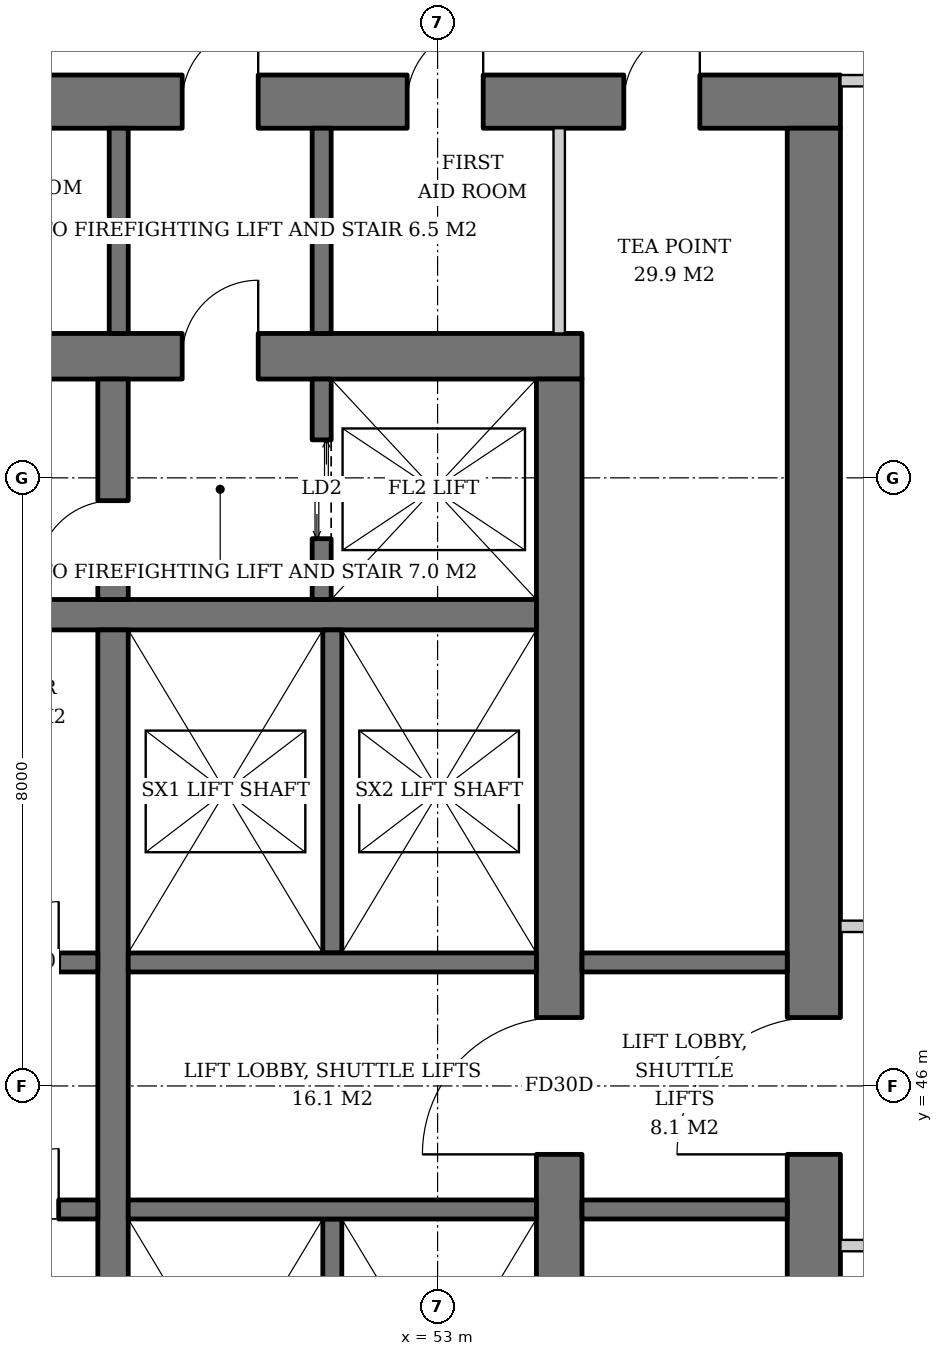
"""IFC4 building model, lengths in metres.
Left out: names, types, materials, properties, quantities, classifications, styles, units other than length and angle.
Written with IfcOpenShell. Run it as: python <this file> out.ifc"""

import sys

from ifc_helpers import new_model, si_unit, direction, frame, frame_2d, origin, place, context, subcontext, project, spatial, rectangle, extrude, element, fill, save


model = new_model("IFC4")
c1 = context("Model", 3, precision=1e-05, world=origin(), true_north=direction((0.0, 1.0)))
c2 = subcontext(c1, "Body", "Model", "MODEL_VIEW")
j1 = project(units=[si_unit("LENGTHUNIT", "METRE"), si_unit("PLANEANGLEUNIT", "RADIAN")], contexts=[c1])
p1 = place(None, origin())
s1 = spatial("IfcSite", under=j1, at=p1, CompositionType="ELEMENT")
p2 = place(p1, origin())
s2 = spatial("IfcBuilding", under=s1, at=p2, CompositionType="ELEMENT")
p3 = place(p2, frame((0.0, 0.0, 123.6)))
s3 = spatial("IfcBuildingStorey", under=s2, at=p3, CompositionType="ELEMENT", Elevation=123.6)
p4 = place(p3, frame((35.1, 55.6, 0.0), z_axis=(0.0, 0.0, 1.0), x_axis=(1.0, 0.0, 0.0)))
e1 = element("IfcWall", 1, at=p4, inside=s3, PredefinedType="SHEAR", context=c2, shape_type="SweptSolid", body=[
    extrude(rectangle(XDim=19.8, YDim=0.6, at=frame_2d((9.9, 0.0))), origin(), (0.0, 0.0, 1.0), 3.8),
])
p5 = place(p4, frame((14.54, 0.0, 0.0)))
e2 = element("IfcOpeningElement", 2, at=p5, cuts=e1, PredefinedType="OPENING", context=c2, shape_type="SweptSolid", body=[
    extrude(rectangle(XDim=1.0, YDim=2.1, at=frame_2d((0.5, 1.05))), frame((0.0, 0.31, 0.0), z_axis=(0.0, -1.0, 0.0), x_axis=(1.0, 0.0, 0.0)), (0.0, 0.0, 1.0), 0.62),
])
p6 = place(p4, frame((2.425, 0.0, 0.0)))
e3 = element("IfcOpeningElement", 3, at=p6, cuts=e1, PredefinedType="OPENING", context=c2, shape_type="SweptSolid", body=[
    extrude(rectangle(XDim=1.0, YDim=2.1, at=frame_2d((0.5, 1.05))), frame((0.0, 0.31, 0.0), z_axis=(0.0, -1.0, 0.0), x_axis=(1.0, 0.0, 0.0)), (0.0, 0.0, 1.0), 0.62),
])
p7 = place(p3, frame((54.6, 36.7, 0.0), z_axis=(0.0, 0.0, 1.0), x_axis=(0.0, 1.0, 0.0)))
e4 = element("IfcWall", 4, at=p7, inside=s3, PredefinedType="SHEAR", context=c2, shape_type="SweptSolid", body=[
    extrude(rectangle(XDim=18.6, YDim=0.6, at=frame_2d((9.3, 0.0))), origin(), (0.0, 0.0, 1.0), 3.8),
])
p8 = place(p7, frame((8.4, 0.0, 0.0)))
e5 = element("IfcOpeningElement", 5, at=p8, cuts=e4, PredefinedType="OPENING", context=c2, shape_type="SweptSolid", body=[
    extrude(rectangle(XDim=1.8, YDim=2.4, at=frame_2d((0.9, 1.2))), frame((0.0, 0.31, 0.0), z_axis=(0.0, -1.0, 0.0), x_axis=(1.0, 0.0, 0.0)), (0.0, 0.0, 1.0), 0.62),
])
p9 = place(p3, frame((31.7, 58.95, 0.0), z_axis=(0.0, 0.0, 1.0), x_axis=(1.0, 0.0, 0.0)))
e6 = element("IfcWall", 6, at=p9, inside=s3, PredefinedType="SHEAR", context=c2, shape_type="SweptSolid", body=[
    extrude(rectangle(XDim=26.6, YDim=0.7, at=frame_2d((13.3, 0.0))), origin(), (0.0, 0.0, 1.0), 3.8),
])
p10 = place(p9, frame((17.94, 0.0, 0.0)))
e7 = element("IfcOpeningElement", 7, at=p10, cuts=e6, PredefinedType="OPENING", context=c2, shape_type="SweptSolid", body=[
    extrude(rectangle(XDim=1.0, YDim=2.1, at=frame_2d((0.5, 1.05))), frame((0.0, 0.36, 0.0), z_axis=(0.0, -1.0, 0.0), x_axis=(1.0, 0.0, 0.0)), (0.0, 0.0, 1.0), 0.72),
])
p11 = place(p9, frame((5.825, 0.0, 0.0)))
e8 = element("IfcOpeningElement", 8, at=p11, cuts=e6, PredefinedType="OPENING", context=c2, shape_type="SweptSolid", body=[
    extrude(rectangle(XDim=1.0, YDim=2.1, at=frame_2d((0.5, 1.05))), frame((0.0, 0.36, 0.0), z_axis=(0.0, -1.0, 0.0), x_axis=(1.0, 0.0, 0.0)), (0.0, 0.0, 1.0), 0.72),
])
p12 = place(p9, frame((1.837, 0.0, 0.0)))
e9 = element("IfcOpeningElement", 9, at=p12, cuts=e6, PredefinedType="OPENING", context=c2, shape_type="SweptSolid", body=[
    extrude(rectangle(XDim=1.0, YDim=2.1, at=frame_2d((0.5, 1.05))), frame((0.0, 0.36, 0.0), z_axis=(0.0, -1.0, 0.0), x_axis=(1.0, 0.0, 0.0)), (0.0, 0.0, 1.0), 0.72),
])
p13 = place(p9, frame((3.781, 0.0, 0.0)))
e10 = element("IfcOpeningElement", 10, at=p13, cuts=e6, PredefinedType="OPENING", context=c2, shape_type="SweptSolid", body=[
    extrude(rectangle(XDim=1.0, YDim=2.1, at=frame_2d((0.5, 1.05))), frame((0.0, 0.36, 0.0), z_axis=(0.0, -1.0, 0.0), x_axis=(1.0, 0.0, 0.0)), (0.0, 0.0, 1.0), 0.72),
])
p14 = place(p9, frame((8.342, 0.0, 0.0)))
e11 = element("IfcOpeningElement", 11, at=p14, cuts=e6, PredefinedType="OPENING", context=c2, shape_type="SweptSolid", body=[
    extrude(rectangle(XDim=1.0, YDim=2.1, at=frame_2d((0.5, 1.05))), frame((0.0, 0.36, 0.0), z_axis=(0.0, -1.0, 0.0), x_axis=(1.0, 0.0, 0.0)), (0.0, 0.0, 1.0), 0.72),
])
p15 = place(p9, frame((11.626, 0.0, 0.0)))
e12 = element("IfcOpeningElement", 12, at=p15, cuts=e6, PredefinedType="OPENING", context=c2, shape_type="SweptSolid", body=[
    extrude(rectangle(XDim=1.0, YDim=2.1, at=frame_2d((0.5, 1.05))), frame((0.0, 0.36, 0.0), z_axis=(0.0, -1.0, 0.0), x_axis=(1.0, 0.0, 0.0)), (0.0, 0.0, 1.0), 0.72),
])
p16 = place(p9, frame((14.862, 0.0, 0.0)))
e13 = element("IfcOpeningElement", 13, at=p16, cuts=e6, PredefinedType="OPENING", context=c2, shape_type="SweptSolid", body=[
    extrude(rectangle(XDim=1.0, YDim=2.1, at=frame_2d((0.5, 1.05))), frame((0.0, 0.36, 0.0), z_axis=(0.0, -1.0, 0.0), x_axis=(1.0, 0.0, 0.0)), (0.0, 0.0, 1.0), 0.72),
])
p17 = place(p9, frame((20.9, 0.0, 0.0)))
e14 = element("IfcOpeningElement", 14, at=p17, cuts=e6, PredefinedType="OPENING", context=c2, shape_type="SweptSolid", body=[
    extrude(rectangle(XDim=1.0, YDim=2.1, at=frame_2d((0.5, 1.05))), frame((0.0, 0.36, 0.0), z_axis=(0.0, -1.0, 0.0), x_axis=(1.0, 0.0, 0.0)), (0.0, 0.0, 1.0), 0.72),
])
p18 = place(p9, frame((23.75, 0.0, 0.0)))
e15 = element("IfcOpeningElement", 15, at=p18, cuts=e6, PredefinedType="OPENING", context=c2, shape_type="SweptSolid", body=[
    extrude(rectangle(XDim=1.0, YDim=2.1, at=frame_2d((0.5, 1.05))), frame((0.0, 0.36, 0.0), z_axis=(0.0, -1.0, 0.0), x_axis=(1.0, 0.0, 0.0)), (0.0, 0.0, 1.0), 0.72),
])
p19 = place(p3, frame((57.95, 33.4, 0.0), z_axis=(0.0, 0.0, 1.0), x_axis=(0.0, 1.0, 0.0)))
e16 = element("IfcWall", 16, at=p19, inside=s3, PredefinedType="SHEAR", context=c2, shape_type="SweptSolid", body=[
    extrude(rectangle(XDim=25.2, YDim=0.7, at=frame_2d((12.6, 0.0))), origin(), (0.0, 0.0, 1.0), 3.8),
])
p20 = place(p19, frame((11.7, 0.0, 0.0)))
e17 = element("IfcOpeningElement", 17, at=p20, cuts=e16, PredefinedType="OPENING", context=c2, shape_type="SweptSolid", body=[
    extrude(rectangle(XDim=1.8, YDim=2.4, at=frame_2d((0.9, 1.2))), frame((0.0, 0.36, 0.0), z_axis=(0.0, -1.0, 0.0), x_axis=(1.0, 0.0, 0.0)), (0.0, 0.0, 1.0), 0.72),
])
p21 = place(p3, frame((35.7, 52.2, 0.0), z_axis=(0.0, 0.0, 1.0), x_axis=(1.0, 0.0, 0.0)))
e18 = element("IfcWall", 18, at=p21, inside=s3, PredefinedType="SHEAR", context=c2, shape_type="SweptSolid", body=[
    extrude(rectangle(XDim=18.6, YDim=0.4, at=frame_2d((9.3, 0.0))), origin(), (0.0, 0.0, 1.0), 3.8),
])
p22 = place(p3, frame((48.73, 40.0, 0.0), z_axis=(0.0, 0.0, 1.0), x_axis=(0.0, 1.0, 0.0)))
e19 = element("IfcWall", 19, at=p22, inside=s3, PredefinedType="SHEAR", context=c2, shape_type="SweptSolid", body=[
    extrude(rectangle(XDim=12.0, YDim=0.4, at=frame_2d((6.0, 0.0))), origin(), (0.0, 0.0, 1.0), 3.8),
])
p23 = place(p3, frame((48.73, 52.4, 0.0), z_axis=(0.0, 0.0, 1.0), x_axis=(0.0, 1.0, 0.0)))
e20 = element("IfcWall", 20, at=p23, inside=s3, PredefinedType="SHEAR", context=c2, shape_type="SweptSolid", body=[
    extrude(rectangle(XDim=2.9, YDim=0.4, at=frame_2d((1.45, 0.0))), origin(), (0.0, 0.0, 1.0), 3.8),
])
p24 = place(p23, frame((0.3, 0.0, 0.0)))
e21 = element("IfcOpeningElement", 21, at=p24, cuts=e20, PredefinedType="OPENING", context=c2, shape_type="SweptSolid", body=[
    extrude(rectangle(XDim=1.0, YDim=2.1, at=frame_2d((0.5, 1.05))), frame((0.0, 0.21, 0.0), z_axis=(0.0, -1.0, 0.0), x_axis=(1.0, 0.0, 0.0)), (0.0, 0.0, 1.0), 0.42),
])
p25 = place(p3, frame((51.475, 52.4, 0.0), z_axis=(0.0, 0.0, 1.0), x_axis=(0.0, 1.0, 0.0)))
e22 = element("IfcWall", 22, at=p25, inside=s3, PredefinedType="SHEAR", context=c2, shape_type="SweptSolid", body=[
    extrude(rectangle(XDim=2.9, YDim=0.25, at=frame_2d((1.45, 0.0))), origin(), (0.0, 0.0, 1.0), 3.8),
])
p26 = place(p25, frame((0.8, 0.0, 0.0)))
e23 = element("IfcOpeningElement", 23, at=p26, cuts=e22, PredefinedType="OPENING", context=c2, shape_type="SweptSolid", body=[
    extrude(rectangle(XDim=1.3, YDim=2.2, at=frame_2d((0.65, 1.1))), frame((0.0, 0.135, 0.0), z_axis=(0.0, -1.0, 0.0), x_axis=(1.0, 0.0, 0.0)), (0.0, 0.0, 1.0), 0.27),
])
p27 = place(p3, frame((35.7, 47.625, 0.0), z_axis=(0.0, 0.0, 1.0), x_axis=(1.0, 0.0, 0.0)))
e24 = element("IfcWall", 24, at=p27, inside=s3, PredefinedType="SHEAR", context=c2, shape_type="SweptSolid", body=[
    extrude(rectangle(XDim=12.83, YDim=0.25, at=frame_2d((6.415, 0.0))), origin(), (0.0, 0.0, 1.0), 3.8),
])
p28 = place(p27, frame((0.7, 0.0, 0.0)))
e25 = element("IfcOpeningElement", 25, at=p28, cuts=e24, PredefinedType="OPENING", context=c2, shape_type="SweptSolid", body=[
    extrude(rectangle(XDim=1.1, YDim=2.2, at=frame_2d((0.55, 1.1))), frame((0.0, 0.135, 0.0), z_axis=(0.0, -1.0, 0.0), x_axis=(1.0, 0.0, 0.0)), (0.0, 0.0, 1.0), 0.27),
])
p29 = place(p27, frame((3.45, 0.0, 0.0)))
e26 = element("IfcOpeningElement", 26, at=p29, cuts=e24, PredefinedType="OPENING", context=c2, shape_type="SweptSolid", body=[
    extrude(rectangle(XDim=1.1, YDim=2.2, at=frame_2d((0.55, 1.1))), frame((0.0, 0.135, 0.0), z_axis=(0.0, -1.0, 0.0), x_axis=(1.0, 0.0, 0.0)), (0.0, 0.0, 1.0), 0.27),
])
p30 = place(p27, frame((6.2, 0.0, 0.0)))
e27 = element("IfcOpeningElement", 27, at=p30, cuts=e24, PredefinedType="OPENING", context=c2, shape_type="SweptSolid", body=[
    extrude(rectangle(XDim=1.1, YDim=2.2, at=frame_2d((0.55, 1.1))), frame((0.0, 0.135, 0.0), z_axis=(0.0, -1.0, 0.0), x_axis=(1.0, 0.0, 0.0)), (0.0, 0.0, 1.0), 0.27),
])
p31 = place(p27, frame((8.95, 0.0, 0.0)))
e28 = element("IfcOpeningElement", 28, at=p31, cuts=e24, PredefinedType="OPENING", context=c2, shape_type="SweptSolid", body=[
    extrude(rectangle(XDim=1.1, YDim=2.2, at=frame_2d((0.55, 1.1))), frame((0.0, 0.135, 0.0), z_axis=(0.0, -1.0, 0.0), x_axis=(1.0, 0.0, 0.0)), (0.0, 0.0, 1.0), 0.27),
])
p32 = place(p27, frame((11.515, 0.0, 0.0)))
e29 = element("IfcOpeningElement", 29, at=p32, cuts=e24, PredefinedType="OPENING", context=c2, shape_type="SweptSolid", body=[
    extrude(rectangle(XDim=0.8, YDim=2.0, at=frame_2d((0.4, 1.0))), frame((0.0, 0.135, 0.0), z_axis=(0.0, -1.0, 0.0), x_axis=(1.0, 0.0, 0.0)), (0.0, 0.0, 1.0), 0.27),
])
p33 = place(p3, frame((35.7, 44.375, 0.0), z_axis=(0.0, 0.0, 1.0), x_axis=(1.0, 0.0, 0.0)))
e30 = element("IfcWall", 30, at=p33, inside=s3, PredefinedType="SHEAR", context=c2, shape_type="SweptSolid", body=[
    extrude(rectangle(XDim=12.83, YDim=0.25, at=frame_2d((6.415, 0.0))), origin(), (0.0, 0.0, 1.0), 3.8),
])
p34 = place(p33, frame((0.7, 0.0, 0.0)))
e31 = element("IfcOpeningElement", 31, at=p34, cuts=e30, PredefinedType="OPENING", context=c2, shape_type="SweptSolid", body=[
    extrude(rectangle(XDim=1.1, YDim=2.2, at=frame_2d((0.55, 1.1))), frame((0.0, 0.135, 0.0), z_axis=(0.0, -1.0, 0.0), x_axis=(1.0, 0.0, 0.0)), (0.0, 0.0, 1.0), 0.27),
])
p35 = place(p33, frame((3.45, 0.0, 0.0)))
e32 = element("IfcOpeningElement", 32, at=p35, cuts=e30, PredefinedType="OPENING", context=c2, shape_type="SweptSolid", body=[
    extrude(rectangle(XDim=1.1, YDim=2.2, at=frame_2d((0.55, 1.1))), frame((0.0, 0.135, 0.0), z_axis=(0.0, -1.0, 0.0), x_axis=(1.0, 0.0, 0.0)), (0.0, 0.0, 1.0), 0.27),
])
p36 = place(p33, frame((6.2, 0.0, 0.0)))
e33 = element("IfcOpeningElement", 33, at=p36, cuts=e30, PredefinedType="OPENING", context=c2, shape_type="SweptSolid", body=[
    extrude(rectangle(XDim=1.1, YDim=2.2, at=frame_2d((0.55, 1.1))), frame((0.0, 0.135, 0.0), z_axis=(0.0, -1.0, 0.0), x_axis=(1.0, 0.0, 0.0)), (0.0, 0.0, 1.0), 0.27),
])
p37 = place(p33, frame((8.95, 0.0, 0.0)))
e34 = element("IfcOpeningElement", 34, at=p37, cuts=e30, PredefinedType="OPENING", context=c2, shape_type="SweptSolid", body=[
    extrude(rectangle(XDim=1.1, YDim=2.2, at=frame_2d((0.55, 1.1))), frame((0.0, 0.135, 0.0), z_axis=(0.0, -1.0, 0.0), x_axis=(1.0, 0.0, 0.0)), (0.0, 0.0, 1.0), 0.27),
])
p38 = place(p33, frame((11.515, 0.0, 0.0)))
e35 = element("IfcOpeningElement", 35, at=p38, cuts=e30, PredefinedType="OPENING", context=c2, shape_type="SweptSolid", body=[
    extrude(rectangle(XDim=0.8, YDim=2.0, at=frame_2d((0.4, 1.0))), frame((0.0, 0.135, 0.0), z_axis=(0.0, -1.0, 0.0), x_axis=(1.0, 0.0, 0.0)), (0.0, 0.0, 1.0), 0.27),
])
p39 = place(p3, frame((51.615, 47.75, 0.0), z_axis=(0.0, 0.0, 1.0), x_axis=(0.0, 1.0, 0.0)))
e36 = element("IfcWall", 36, at=p39, inside=s3, PredefinedType="SHEAR", context=c2, shape_type="SweptSolid", body=[
    extrude(rectangle(XDim=4.25, YDim=0.25, at=frame_2d((2.125, 0.0))), origin(), (0.0, 0.0, 1.0), 3.8),
])
p40 = place(p3, frame((48.93, 47.625, 0.0), z_axis=(0.0, 0.0, 1.0), x_axis=(1.0, 0.0, 0.0)))
e37 = element("IfcWall", 37, at=p40, inside=s3, PredefinedType="SHEAR", context=c2, shape_type="SweptSolid", body=[
    extrude(rectangle(XDim=5.37, YDim=0.25, at=frame_2d((2.685, 0.0))), origin(), (0.0, 0.0, 1.0), 3.8),
])
p41 = place(p3, frame((51.615, 44.25, 0.0), z_axis=(0.0, 0.0, 1.0), x_axis=(0.0, -1.0, 0.0)))
e38 = element("IfcWall", 38, at=p41, inside=s3, PredefinedType="SHEAR", context=c2, shape_type="SweptSolid", body=[
    extrude(rectangle(XDim=4.25, YDim=0.25, at=frame_2d((2.125, 0.0))), origin(), (0.0, 0.0, 1.0), 3.8),
])
p42 = place(p3, frame((48.93, 44.375, 0.0), z_axis=(0.0, 0.0, 1.0), x_axis=(1.0, 0.0, 0.0)))
e39 = element("IfcWall", 39, at=p42, inside=s3, PredefinedType="SHEAR", context=c2, shape_type="SweptSolid", body=[
    extrude(rectangle(XDim=5.37, YDim=0.25, at=frame_2d((2.685, 0.0))), origin(), (0.0, 0.0, 1.0), 3.8),
])
for number, where, z_axis, x_axis in (
    (40, (48.805, 55.9, 0.0), (0.0, 0.0, 1.0), (0.0, 1.0, 0.0)),
    (41, (51.475, 55.9, 0.0), (0.0, 0.0, 1.0), (0.0, 1.0, 0.0)),
    (42, (54.9, 44.375, 0.0), (0.0, 0.0, 1.0), (1.0, 0.0, 0.0)),
    (43, (54.9, 47.625, 0.0), (0.0, 0.0, 1.0), (1.0, 0.0, 0.0)),
):
    element("IfcWall", number, at=place(p3, frame(where, z_axis=z_axis, x_axis=x_axis)), inside=s3, PredefinedType="SOLIDWALL", context=c2, shape_type="SweptSolid", body=[
        extrude(rectangle(XDim=2.7, YDim=0.25, at=frame_2d((1.35, 0.0))), origin(), (0.0, 0.0, 1.0), 3.62),
    ])
p43 = place(p3, frame((54.6, 55.9, 0.0), z_axis=(0.0, 0.0, 1.0), x_axis=(0.0, 1.0, 0.0)))
e44 = element("IfcWall", 44, at=p43, inside=s3, PredefinedType="SOLIDWALL", context=c2, shape_type="SweptSolid", body=[
    extrude(rectangle(XDim=2.7, YDim=0.15, at=frame_2d((1.35, 0.0))), origin(), (0.0, 0.0, 1.0), 3.62),
])
for number, where, z_axis, x_axis in (
    (45, (58.3, 43.9, 0.0), (0.0, 0.0, 1.0), (1.0, 0.0, 0.0)),
    (46, (58.3, 48.1, 0.0), (0.0, 0.0, 1.0), (1.0, 0.0, 0.0)),
    (47, (58.3, 59.225, 0.0), (0.0, 0.0, 1.0), (1.0, 0.0, 0.0)),
):
    element("IfcWall", number, at=place(p3, frame(where, z_axis=z_axis, x_axis=x_axis)), inside=s3, PredefinedType="PARTITIONING", context=c2, shape_type="SweptSolid", body=[
        extrude(rectangle(XDim=1.725, YDim=0.15, at=frame_2d((0.862, 0.0))), origin(), (0.0, 0.0, 1.0), 3.62),
    ])
p44 = place(p26, origin())
e48 = element("IfcDoor", 48, at=p44, inside=s3, OperationType="DOUBLE_DOOR_SLIDING", PredefinedType="DOOR", context=c2, shape_type="SweptSolid", body=[
    extrude(rectangle(XDim=1.3, YDim=2.2, at=frame_2d((0.65, 1.1))), frame((0.0, 0.025, 0.0), z_axis=(0.0, -1.0, 0.0), x_axis=(1.0, 0.0, 0.0)), (0.0, 0.0, 1.0), 0.05),
])
fill(e23, e48)
p45 = place(p32, origin())
e49 = element("IfcDoor", 49, at=p45, inside=s3, OperationType="SINGLE_SWING_RIGHT", PredefinedType="DOOR", context=c2, shape_type="SweptSolid", body=[
    extrude(rectangle(XDim=0.8, YDim=2.0, at=frame_2d((0.4, 1.0))), frame((0.0, 0.025, 0.0), z_axis=(0.0, -1.0, 0.0), x_axis=(1.0, 0.0, 0.0)), (0.0, 0.0, 1.0), 0.05),
])
fill(e29, e49)
p46 = place(p38, origin())
e50 = element("IfcDoor", 50, at=p46, inside=s3, OperationType="SINGLE_SWING_RIGHT", PredefinedType="DOOR", context=c2, shape_type="SweptSolid", body=[
    extrude(rectangle(XDim=0.8, YDim=2.0, at=frame_2d((0.4, 1.0))), frame((0.0, 0.025, 0.0), z_axis=(0.0, -1.0, 0.0), x_axis=(1.0, 0.0, 0.0)), (0.0, 0.0, 1.0), 0.05),
])
fill(e35, e50)
p47 = place(p24, origin())
e51 = element("IfcDoor", 51, at=p47, inside=s3, OperationType="SINGLE_SWING_LEFT", PredefinedType="DOOR", context=c2, shape_type="SweptSolid", body=[
    extrude(rectangle(XDim=1.0, YDim=2.1, at=frame_2d((0.5, 1.05))), frame((0.0, 0.025, 0.0), z_axis=(0.0, -1.0, 0.0), x_axis=(1.0, 0.0, 0.0)), (0.0, 0.0, 1.0), 0.05),
])
fill(e21, e51)
p48 = place(p5, origin())
e52 = element("IfcDoor", 52, at=p48, inside=s3, OperationType="SINGLE_SWING_RIGHT", PredefinedType="DOOR", context=c2, shape_type="SweptSolid", body=[
    extrude(rectangle(XDim=1.0, YDim=2.1, at=frame_2d((0.5, 1.05))), frame((0.0, 0.025, 0.0), z_axis=(0.0, -1.0, 0.0), x_axis=(1.0, 0.0, 0.0)), (0.0, 0.0, 1.0), 0.05),
])
fill(e2, e52)
p49 = place(p8, origin())
e53 = element("IfcDoor", 53, at=p49, inside=s3, OperationType="DOUBLE_DOOR_SINGLE_SWING", PredefinedType="DOOR", context=c2, shape_type="SweptSolid", body=[
    extrude(rectangle(XDim=1.8, YDim=2.4, at=frame_2d((0.9, 1.2))), frame((0.0, 0.025, 0.0), z_axis=(0.0, -1.0, 0.0), x_axis=(1.0, 0.0, 0.0)), (0.0, 0.0, 1.0), 0.05),
])
fill(e5, e53)
p50 = place(p20, origin())
e54 = element("IfcDoor", 54, at=p50, inside=s3, OperationType="DOUBLE_DOOR_SINGLE_SWING", PredefinedType="DOOR", context=c2, shape_type="SweptSolid", body=[
    extrude(rectangle(XDim=1.8, YDim=2.4, at=frame_2d((0.9, 1.2))), frame((0.0, 0.025, 0.0), z_axis=(0.0, -1.0, 0.0), x_axis=(1.0, 0.0, 0.0)), (0.0, 0.0, 1.0), 0.05),
])
fill(e17, e54)
p51 = place(p10, origin())
e55 = element("IfcDoor", 55, at=p51, inside=s3, OperationType="SINGLE_SWING_RIGHT", PredefinedType="DOOR", context=c2, shape_type="SweptSolid", body=[
    extrude(rectangle(XDim=1.0, YDim=2.1, at=frame_2d((0.5, 1.05))), frame((0.0, 0.025, 0.0), z_axis=(0.0, -1.0, 0.0), x_axis=(1.0, 0.0, 0.0)), (0.0, 0.0, 1.0), 0.05),
])
fill(e7, e55)
p52 = place(p17, origin())
e56 = element("IfcDoor", 56, at=p52, inside=s3, OperationType="SINGLE_SWING_RIGHT", PredefinedType="DOOR", context=c2, shape_type="SweptSolid", body=[
    extrude(rectangle(XDim=1.0, YDim=2.1, at=frame_2d((0.5, 1.05))), frame((0.0, -0.29, 0.0), z_axis=(0.0, -1.0, 0.0), x_axis=(1.0, 0.0, 0.0)), (0.0, 0.0, 1.0), 0.05),
])
fill(e14, e56)
p53 = place(p18, origin())
e57 = element("IfcDoor", 57, at=p53, inside=s3, OperationType="SINGLE_SWING_RIGHT", PredefinedType="DOOR", context=c2, shape_type="SweptSolid", body=[
    extrude(rectangle(XDim=1.0, YDim=2.1, at=frame_2d((0.5, 1.05))), frame((0.0, -0.29, 0.0), z_axis=(0.0, -1.0, 0.0), x_axis=(1.0, 0.0, 0.0)), (0.0, 0.0, 1.0), 0.05),
])
fill(e15, e57)
save(model, sys.argv[1])
